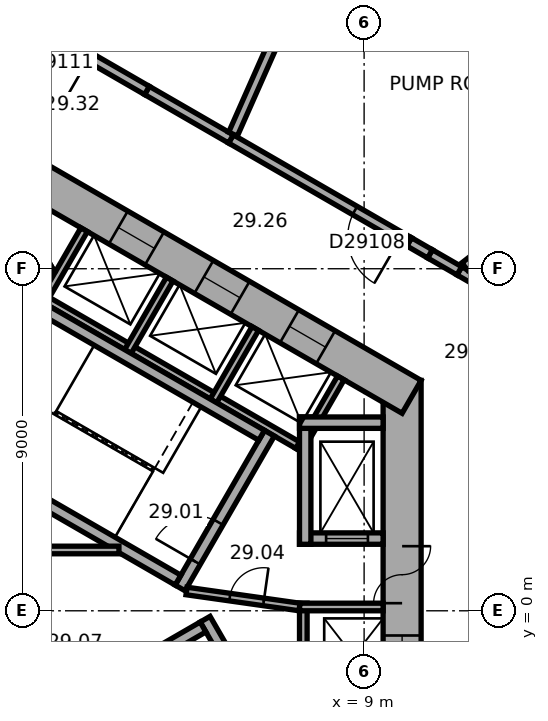
"""IFC4 building model, lengths in metres.
Left out: names, types, materials, properties, quantities, classifications, styles, units other than length and angle.
Written with IfcOpenShell. Run it as: python <this file> out.ifc"""

import sys

from ifc_helpers import new_model, si_unit, direction, frame, frame_2d, origin, place, context, subcontext, project, spatial, rectangle, extrude, element, fill, save


model = new_model("IFC4")
c1 = context("Model", 3, precision=1e-05, world=origin(), true_north=direction((0.0, 1.0)))
c2 = subcontext(c1, "Body", "Model", "MODEL_VIEW")
j1 = project(units=[si_unit("LENGTHUNIT", "METRE"), si_unit("PLANEANGLEUNIT", "RADIAN")], contexts=[c1])
p1 = place(None, origin())
s1 = spatial("IfcSite", under=j1, at=p1, CompositionType="ELEMENT")
p2 = place(p1, origin())
s2 = spatial("IfcBuilding", under=s1, at=p2, CompositionType="ELEMENT")
p3 = place(p2, frame((0.0, 0.0, 119.9)))
s3 = spatial("IfcBuildingStorey", under=s2, at=p3, CompositionType="ELEMENT", Elevation=119.9)
p4 = place(p3, frame((10.0, -6.062, 0.0), z_axis=(0.0, 0.0, 1.0), x_axis=(0.0, 1.0, 0.0)))
e1 = element("IfcWall", 1, at=p4, inside=s3, PredefinedType="SHEAR", context=c2, shape_type="SweptSolid", body=[
    extrude(rectangle(XDim=12.125, YDim=1.0, at=frame_2d((6.062, 0.0))), origin(), (0.0, 0.0, 1.0), 4.5),
])
p5 = place(p4, frame((6.262, 0.0, 0.0)))
e2 = element("IfcOpeningElement", 2, at=p5, cuts=e1, PredefinedType="OPENING", context=c2, shape_type="SweptSolid", body=[
    extrude(rectangle(XDim=1.5, YDim=2.1, at=frame_2d((0.75, 1.05))), frame((0.0, 0.51, 0.0), z_axis=(0.0, -1.0, 0.0), x_axis=(1.0, 0.0, 0.0)), (0.0, 0.0, 1.0), 1.02),
])
p6 = place(p4, frame((1.712, 0.0, 0.0)))
e3 = element("IfcOpeningElement", 3, at=p6, cuts=e1, PredefinedType="OPENING", context=c2, shape_type="SweptSolid", body=[
    extrude(rectangle(XDim=1.1, YDim=2.1, at=frame_2d((0.55, 1.05))), frame((0.0, 0.51, 0.0), z_axis=(0.0, -1.0, 0.0), x_axis=(1.0, 0.0, 0.0)), (0.0, 0.0, 1.0), 1.02),
])
p7 = place(p4, frame((4.312, 0.0, 0.0)))
e4 = element("IfcOpeningElement", 4, at=p7, cuts=e1, PredefinedType="OPENING", context=c2, shape_type="SweptSolid", body=[
    extrude(rectangle(XDim=1.1, YDim=2.1, at=frame_2d((0.55, 1.05))), frame((0.0, 0.51, 0.0), z_axis=(0.0, -1.0, 0.0), x_axis=(1.0, 0.0, 0.0)), (0.0, 0.0, 1.0), 1.02),
])
p8 = place(p3, frame((10.25, 5.629, 0.0), z_axis=(0.0, 0.0, 1.0), x_axis=(-0.866022616891, 0.50000482701, 0.0)))
e5 = element("IfcWall", 5, at=p8, inside=s3, PredefinedType="SHEAR", context=c2, shape_type="SweptSolid", body=[
    extrude(rectangle(XDim=12.125, YDim=1.0, at=frame_2d((6.062, 0.0))), origin(), (0.0, 0.0, 1.0), 4.5),
])
p9 = place(p8, frame((2.612, 0.0, 0.0)))
e6 = element("IfcOpeningElement", 6, at=p9, cuts=e5, PredefinedType="OPENING", context=c2, shape_type="SweptSolid", body=[
    extrude(rectangle(XDim=1.1, YDim=2.1, at=frame_2d((0.55, 1.05))), frame((0.0, 0.51, 0.0), z_axis=(0.0, -1.0, 0.0), x_axis=(1.0, 0.0, 0.0)), (0.0, 0.0, 1.0), 1.02),
])
p10 = place(p8, frame((5.212, 0.0, 0.0)))
e7 = element("IfcOpeningElement", 7, at=p10, cuts=e5, PredefinedType="OPENING", context=c2, shape_type="SweptSolid", body=[
    extrude(rectangle(XDim=1.1, YDim=2.1, at=frame_2d((0.55, 1.05))), frame((0.0, 0.51, 0.0), z_axis=(0.0, -1.0, 0.0), x_axis=(1.0, 0.0, 0.0)), (0.0, 0.0, 1.0), 1.02),
])
p11 = place(p8, frame((7.812, 0.0, 0.0)))
e8 = element("IfcOpeningElement", 8, at=p11, cuts=e5, PredefinedType="OPENING", context=c2, shape_type="SweptSolid", body=[
    extrude(rectangle(XDim=1.1, YDim=2.1, at=frame_2d((0.55, 1.05))), frame((0.0, 0.51, 0.0), z_axis=(0.0, -1.0, 0.0), x_axis=(1.0, 0.0, 0.0)), (0.0, 0.0, 1.0), 1.02),
])
p12 = place(p3, frame((7.4, -5.2, 0.0), z_axis=(0.0, 0.0, 1.0), x_axis=(0.0, 1.0, 0.0)))
e9 = element("IfcWall", 9, at=p12, inside=s3, PredefinedType="PARTITIONING", context=c2, shape_type="SweptSolid", body=[
    extrude(rectangle(XDim=5.4, YDim=0.2, at=frame_2d((2.7, 0.0))), origin(), (0.0, 0.0, 1.0), 4.22),
])
p13 = place(p3, frame((7.3, 0.1, 0.0), z_axis=(0.0, 0.0, 1.0), x_axis=(1.0, 0.0, 0.0)))
e10 = element("IfcWall", 10, at=p13, inside=s3, PredefinedType="PARTITIONING", context=c2, shape_type="SweptSolid", body=[
    extrude(rectangle(XDim=2.2, YDim=0.2, at=frame_2d((1.1, 0.0))), origin(), (0.0, 0.0, 1.0), 4.22),
])
p14 = place(p3, frame((7.424, 4.259, 0.0), z_axis=(0.0, 0.0, 1.0), x_axis=(-0.866026010844, 0.49999894854, 0.0)))
e11 = element("IfcWall", 11, at=p14, inside=s3, PredefinedType="PARTITIONING", context=c2, shape_type="SweptSolid", body=[
    extrude(rectangle(XDim=8.0, YDim=0.2, at=frame_2d((4.0, 0.0))), origin(), (0.0, 0.0, 1.0), 4.22),
])
for number, where, z_axis, x_axis in (
    (12, (7.287, 4.222, 0.0), (0.0, 0.0, 1.0), (0.5, 0.866, 0.0)),
    (13, (5.036, 5.522, 0.0), (0.0, 0.0, 1.0), (0.5, 0.866, 0.0)),
    (14, (2.784, 6.822, 0.0), (0.0, 0.0, 1.0), (0.5, 0.866, 0.0)),
    (15, (0.532, 8.122, 0.0), (0.0, 0.0, 1.0), (0.5, 0.866, 0.0)),
):
    element("IfcWall", number, at=place(p3, frame(where, z_axis=z_axis, x_axis=x_axis)), inside=s3, PredefinedType="PARTITIONING", context=c2, shape_type="SweptSolid", body=[
        extrude(rectangle(XDim=2.2, YDim=0.2, at=frame_2d((1.1, 0.0))), origin(), (0.0, 0.0, 1.0), 4.22),
    ])
p15 = place(p3, frame((0.803, 9.009, 0.0), z_axis=(0.0, 0.0, 1.0), x_axis=(-0.866028230842, -0.499995103361, 0.0)))
e16 = element("IfcWall", 16, at=p15, inside=s3, PredefinedType="PARTITIONING", context=c2, shape_type="SweptSolid", body=[
    extrude(rectangle(XDim=5.4, YDim=0.2, at=frame_2d((2.7, 0.0))), origin(), (0.0, 0.0, 1.0), 4.22),
])
p16 = place(p3, frame((0.767, 8.872, 0.0), z_axis=(0.0, 0.0, 1.0), x_axis=(-0.499994660107, 0.866028486751, 0.0)))
e17 = element("IfcWall", 17, at=p16, inside=s3, PredefinedType="PARTITIONING", context=c2, shape_type="SweptSolid", body=[
    extrude(rectangle(XDim=2.2, YDim=0.2, at=frame_2d((1.1, 0.0))), origin(), (0.0, 0.0, 1.0), 4.22),
])
p17 = place(p3, frame((4.158, 0.602, 0.0), z_axis=(0.0, 0.0, 1.0), x_axis=(0.499977259774, 0.866038532462, 0.0)))
e18 = element("IfcWall", 18, at=p17, inside=s3, PredefinedType="SHEAR", context=c2, shape_type="SweptSolid", body=[
    extrude(rectangle(XDim=4.7, YDim=0.3, at=frame_2d((2.35, 0.0))), origin(), (0.0, 0.0, 1.0), 4.22),
])
p18 = place(p17, frame((0.8, 0.0, 0.0)))
e19 = element("IfcOpeningElement", 19, at=p18, cuts=e18, PredefinedType="OPENING", context=c2, shape_type="SweptSolid", body=[
    extrude(rectangle(XDim=1.2, YDim=2.1, at=frame_2d((0.6, 1.05))), frame((0.0, 0.16, 0.0), z_axis=(0.0, -1.0, 0.0), x_axis=(1.0, 0.0, 0.0)), (0.0, 0.0, 1.0), 0.32),
])
for number, where, z_axis, x_axis in (
    (20, (4.103, 0.807, 0.0), (0.0, 0.0, 1.0), (-0.866, 0.5, 0.0)),
    (21, (6.303, 4.617, 0.0), (0.0, 0.0, 1.0), (-0.866, 0.5, 0.0)),
):
    element("IfcWall", number, at=place(p3, frame(where, z_axis=z_axis, x_axis=x_axis)), inside=s3, PredefinedType="SHEAR", context=c2, shape_type="SweptSolid", body=[
        extrude(rectangle(XDim=7.06, YDim=0.3, at=frame_2d((3.53, 0.0))), origin(), (0.0, 0.0, 1.0), 4.22),
    ])
p19 = place(p3, frame((4.816, -0.222, 0.0), z_axis=(0.0, 0.0, 1.0), x_axis=(0.499977259774, -0.866038532462, 0.0)))
e22 = element("IfcWall", 22, at=p19, inside=s3, PredefinedType="SHEAR", context=c2, shape_type="SweptSolid", body=[
    extrude(rectangle(XDim=4.7, YDim=0.3, at=frame_2d((2.35, 0.0))), origin(), (0.0, 0.0, 1.0), 4.22),
])
p20 = place(p3, frame((-1.353, -3.957, 0.0), z_axis=(0.0, 0.0, 1.0), x_axis=(0.866027801685, 0.499995846692, 0.0)))
e23 = element("IfcWall", 23, at=p20, inside=s3, PredefinedType="SHEAR", context=c2, shape_type="SweptSolid", body=[
    extrude(rectangle(XDim=7.06, YDim=0.3, at=frame_2d((3.53, 0.0))), origin(), (0.0, 0.0, 1.0), 4.22),
])
p21 = place(p3, frame((7.3, 1.9, 0.0), z_axis=(0.0, 0.0, 1.0), x_axis=(1.0, 0.0, 0.0)))
e24 = element("IfcWall", 24, at=p21, inside=s3, PredefinedType="SHEAR", context=c2, shape_type="SweptSolid", body=[
    extrude(rectangle(XDim=2.2, YDim=0.3, at=frame_2d((1.1, 0.0))), origin(), (0.0, 0.0, 1.0), 4.22),
])
p22 = place(p21, frame((0.7, 0.0, 0.0)))
e25 = element("IfcOpeningElement", 25, at=p22, cuts=e24, PredefinedType="OPENING", context=c2, shape_type="SweptSolid", body=[
    extrude(rectangle(XDim=1.1, YDim=2.1, at=frame_2d((0.55, 1.05))), frame((0.0, 0.16, 0.0), z_axis=(0.0, -1.0, 0.0), x_axis=(1.0, 0.0, 0.0)), (0.0, 0.0, 1.0), 0.32),
])
p23 = place(p3, frame((7.45, 1.75, 0.0), z_axis=(0.0, 0.0, 1.0), x_axis=(0.0, 1.0, 0.0)))
e26 = element("IfcWall", 26, at=p23, inside=s3, PredefinedType="SHEAR", context=c2, shape_type="SweptSolid", body=[
    extrude(rectangle(XDim=3.35, YDim=0.3, at=frame_2d((1.675, 0.0))), origin(), (0.0, 0.0, 1.0), 4.22),
])
p24 = place(p3, frame((7.3, 4.95, 0.0), z_axis=(0.0, 0.0, 1.0), x_axis=(1.0, 0.0, 0.0)))
e27 = element("IfcWall", 27, at=p24, inside=s3, PredefinedType="SHEAR", context=c2, shape_type="SweptSolid", body=[
    extrude(rectangle(XDim=2.2, YDim=0.3, at=frame_2d((1.1, 0.0))), origin(), (0.0, 0.0, 1.0), 4.22),
])
p25 = place(p3, frame((4.327, 0.521, 0.0), z_axis=(0.0, 0.0, 1.0), x_axis=(0.990124376366, -0.14019172346, 0.0)))
e28 = element("IfcWall", 28, at=p25, inside=s3, PredefinedType="PARTITIONING", context=c2, shape_type="SweptSolid", body=[
    extrude(rectangle(XDim=3.002, YDim=0.2, at=frame_2d((1.501, 0.0))), origin(), (0.0, 0.0, 1.0), 4.22),
])
p26 = place(p25, frame((1.15, 0.0, 0.0)))
e29 = element("IfcOpeningElement", 29, at=p26, cuts=e28, PredefinedType="OPENING", context=c2, shape_type="SweptSolid", body=[
    extrude(rectangle(XDim=0.9, YDim=2.1, at=frame_2d((0.45, 1.05))), frame((0.0, 0.11, 0.0), z_axis=(0.0, -1.0, 0.0), x_axis=(1.0, 0.0, 0.0)), (0.0, 0.0, 1.0), 0.22),
])
p27 = place(p3, frame((-2.72, 1.6, 0.0), z_axis=(0.0, 0.0, 1.0), x_axis=(1.0, 0.0, 0.0)))
e30 = element("IfcWall", 30, at=p27, inside=s3, PredefinedType="PARTITIONING", context=c2, shape_type="SweptSolid", body=[
    extrude(rectangle(XDim=5.269, YDim=0.2, at=frame_2d((2.634, 0.0))), origin(), (0.0, 0.0, 1.0), 4.22),
])
p28 = place(p3, frame((13.5, 7.794, 0.0), z_axis=(0.0, 0.0, 1.0), x_axis=(-0.86594365243, 0.500141570774, 0.0)))
e31 = element("IfcWall", 31, at=p28, inside=s3, PredefinedType="SOLIDWALL", context=c2, shape_type="SweptSolid", body=[
    extrude(rectangle(XDim=2.302, YDim=0.25, at=frame_2d((1.151, 0.0))), origin(), (0.0, 0.0, 1.0), 4.22),
])
p29 = place(p3, frame((10.733, 9.392, 0.0), z_axis=(0.0, 0.0, 1.0), x_axis=(0.86606255962, -0.499935638681, 0.0)))
e32 = element("IfcWall", 32, at=p29, inside=s3, PredefinedType="SOLIDWALL", context=c2, shape_type="SweptSolid", body=[
    extrude(rectangle(XDim=0.892, YDim=0.25, at=frame_2d((0.446, 0.0))), origin(), (0.0, 0.0, 1.0), 4.22),
])
p30 = place(p3, frame((10.186, 9.708, 0.0), z_axis=(0.0, 0.0, 1.0), x_axis=(0.866024844342, -0.500000968981, 0.0)))
e33 = element("IfcWall", 33, at=p30, inside=s3, PredefinedType="SOLIDWALL", context=c2, shape_type="SweptSolid", body=[
    extrude(rectangle(XDim=0.632, YDim=0.25, at=frame_2d((0.316, 0.0))), origin(), (0.0, 0.0, 1.0), 4.22),
])
p31 = place(p3, frame((10.186, 9.708, 0.0), z_axis=(0.0, 0.0, 1.0), x_axis=(-0.866018196172, 0.500012483742, 0.0)))
e34 = element("IfcWall", 34, at=p31, inside=s3, PredefinedType="SOLIDWALL", context=c2, shape_type="SweptSolid", body=[
    extrude(rectangle(XDim=5.416, YDim=0.25, at=frame_2d((2.708, 0.0))), origin(), (0.0, 0.0, 1.0), 4.22),
])
p32 = place(p31, frame((0.25, 0.0, 0.0)))
e35 = element("IfcOpeningElement", 35, at=p32, cuts=e34, PredefinedType="OPENING", context=c2, shape_type="SweptSolid", body=[
    extrude(rectangle(XDim=1.4, YDim=2.1, at=frame_2d((0.7, 1.05))), frame((0.0, 0.135, 0.0), z_axis=(0.0, -1.0, 0.0), x_axis=(1.0, 0.0, 0.0)), (0.0, 0.0, 1.0), 0.27),
])
p33 = place(p3, frame((15.427, 11.993, 0.0), z_axis=(0.0, 0.0, 1.0), x_axis=(-0.789492280001, -0.613760490597, 0.0)))
e36 = element("IfcWall", 36, at=p33, inside=s3, PredefinedType="SOLIDWALL", context=c2, shape_type="SweptSolid", body=[
    extrude(rectangle(XDim=4.786, YDim=0.25, at=frame_2d((2.393, 0.0))), origin(), (0.0, 0.0, 1.0), 3.2),
])
p34 = place(p3, frame((5.495, 12.416, 0.0), z_axis=(0.0, 0.0, 1.0), x_axis=(-0.866043744811, 0.499968231064, 0.0)))
e37 = element("IfcWall", 37, at=p34, inside=s3, PredefinedType="SOLIDWALL", context=c2, shape_type="SweptSolid", body=[
    extrude(rectangle(XDim=2.551, YDim=0.25, at=frame_2d((1.275, 0.0))), origin(), (0.0, 0.0, 1.0), 4.22),
])
p35 = place(p3, frame((3.286, 13.691, 0.0), z_axis=(0.0, 0.0, 1.0), x_axis=(-0.866013897511, 0.50001992892, 0.0)))
e38 = element("IfcWall", 38, at=p35, inside=s3, PredefinedType="SOLIDWALL", context=c2, shape_type="SweptSolid", body=[
    extrude(rectangle(XDim=3.694, YDim=0.25, at=frame_2d((1.847, 0.0))), origin(), (0.0, 0.0, 1.0), 4.22),
])
p36 = place(p35, frame((1.744, 0.0, 0.0)))
e39 = element("IfcOpeningElement", 39, at=p36, cuts=e38, PredefinedType="OPENING", context=c2, shape_type="SweptSolid", body=[
    extrude(rectangle(XDim=1.4, YDim=2.1, at=frame_2d((0.7, 1.05))), frame((0.0, 0.135, 0.0), z_axis=(0.0, -1.0, 0.0), x_axis=(1.0, 0.0, 0.0)), (0.0, 0.0, 1.0), 0.27),
])
p37 = place(p3, frame((7.367, 16.646, 0.0), z_axis=(0.0, 0.0, 1.0), x_axis=(-0.404689706038, -0.914454067642, 0.0)))
e40 = element("IfcWall", 40, at=p37, inside=s3, PredefinedType="SOLIDWALL", context=c2, shape_type="SweptSolid", body=[
    extrude(rectangle(XDim=4.489, YDim=0.25, at=frame_2d((2.245, 0.0))), origin(), (0.0, 0.0, 1.0), 3.2),
])
p38 = place(p3, frame((8.671, 19.589, 0.0), z_axis=(0.0, 0.0, 1.0), x_axis=(0.894943312415, -0.446179860106, 0.0)))
e41 = element("IfcWall", 41, at=p38, inside=s3, PredefinedType="SOLIDWALL", context=c2, shape_type="SweptSolid", body=[
    extrude(rectangle(XDim=11.245, YDim=0.25, at=frame_2d((5.623, 0.0))), origin(), (0.0, 0.0, 1.0), 3.72),
])
p39 = place(p5, origin())
e42 = element("IfcDoor", 42, at=p39, inside=s3, OperationType="DOUBLE_DOOR_SINGLE_SWING", PredefinedType="DOOR", context=c2, shape_type="SweptSolid", body=[
    extrude(rectangle(XDim=1.5, YDim=2.1, at=frame_2d((0.75, 1.05))), frame((0.0, 0.025, 0.0), z_axis=(0.0, -1.0, 0.0), x_axis=(1.0, 0.0, 0.0)), (0.0, 0.0, 1.0), 0.05),
])
fill(e2, e42)
p40 = place(p18, origin())
e43 = element("IfcDoor", 43, at=p40, inside=s3, OperationType="SINGLE_SWING_RIGHT", PredefinedType="DOOR", context=c2, shape_type="SweptSolid", body=[
    extrude(rectangle(XDim=1.2, YDim=2.1, at=frame_2d((0.6, 1.05))), frame((0.0, 0.025, 0.0), z_axis=(0.0, -1.0, 0.0), x_axis=(1.0, 0.0, 0.0)), (0.0, 0.0, 1.0), 0.05),
])
fill(e19, e43)
p41 = place(p26, origin())
e44 = element("IfcDoor", 44, at=p41, inside=s3, OperationType="SINGLE_SWING_LEFT", PredefinedType="DOOR", context=c2, shape_type="SweptSolid", body=[
    extrude(rectangle(XDim=0.9, YDim=2.1, at=frame_2d((0.45, 1.05))), frame((0.0, 0.025, 0.0), z_axis=(0.0, -1.0, 0.0), x_axis=(1.0, 0.0, 0.0)), (0.0, 0.0, 1.0), 0.05),
])
fill(e29, e44)
p42 = place(p22, origin())
e45 = element("IfcDoor", 45, at=p42, inside=s3, OperationType="DOUBLE_DOOR_SLIDING", PredefinedType="DOOR", context=c2, shape_type="SweptSolid", body=[
    extrude(rectangle(XDim=1.1, YDim=2.1, at=frame_2d((0.55, 1.05))), frame((0.0, 0.025, 0.0), z_axis=(0.0, -1.0, 0.0), x_axis=(1.0, 0.0, 0.0)), (0.0, 0.0, 1.0), 0.05),
])
fill(e25, e45)
p43 = place(p7, origin())
e46 = element("IfcDoor", 46, at=p43, inside=s3, OperationType="DOUBLE_DOOR_SLIDING", PredefinedType="DOOR", context=c2, shape_type="SweptSolid", body=[
    extrude(rectangle(XDim=1.1, YDim=2.1, at=frame_2d((0.55, 1.05))), frame((0.0, 0.025, 0.0), z_axis=(0.0, -1.0, 0.0), x_axis=(1.0, 0.0, 0.0)), (0.0, 0.0, 1.0), 0.05),
])
fill(e4, e46)
p44 = place(p9, origin())
e47 = element("IfcDoor", 47, at=p44, inside=s3, OperationType="DOUBLE_DOOR_SLIDING", PredefinedType="DOOR", context=c2, shape_type="SweptSolid", body=[
    extrude(rectangle(XDim=1.1, YDim=2.1, at=frame_2d((0.55, 1.05))), frame((0.0, 0.025, 0.0), z_axis=(0.0, -1.0, 0.0), x_axis=(1.0, 0.0, 0.0)), (0.0, 0.0, 1.0), 0.05),
])
fill(e6, e47)
p45 = place(p10, origin())
e48 = element("IfcDoor", 48, at=p45, inside=s3, OperationType="DOUBLE_DOOR_SLIDING", PredefinedType="DOOR", context=c2, shape_type="SweptSolid", body=[
    extrude(rectangle(XDim=1.1, YDim=2.1, at=frame_2d((0.55, 1.05))), frame((0.0, 0.025, 0.0), z_axis=(0.0, -1.0, 0.0), x_axis=(1.0, 0.0, 0.0)), (0.0, 0.0, 1.0), 0.05),
])
fill(e7, e48)
p46 = place(p11, origin())
e49 = element("IfcDoor", 49, at=p46, inside=s3, OperationType="DOUBLE_DOOR_SLIDING", PredefinedType="DOOR", context=c2, shape_type="SweptSolid", body=[
    extrude(rectangle(XDim=1.1, YDim=2.1, at=frame_2d((0.55, 1.05))), frame((0.0, 0.025, 0.0), z_axis=(0.0, -1.0, 0.0), x_axis=(1.0, 0.0, 0.0)), (0.0, 0.0, 1.0), 0.05),
])
fill(e8, e49)
p47 = place(p32, origin())
e50 = element("IfcDoor", 50, at=p47, inside=s3, OperationType="SINGLE_SWING_LEFT", PredefinedType="DOOR", context=c2, shape_type="SweptSolid", body=[
    extrude(rectangle(XDim=1.4, YDim=2.1, at=frame_2d((0.7, 1.05))), frame((0.0, 0.025, 0.0), z_axis=(0.0, -1.0, 0.0), x_axis=(1.0, 0.0, 0.0)), (0.0, 0.0, 1.0), 0.05),
])
fill(e35, e50)
p48 = place(p36, origin())
e51 = element("IfcDoor", 51, at=p48, inside=s3, OperationType="SINGLE_SWING_LEFT", PredefinedType="DOOR", context=c2, shape_type="SweptSolid", body=[
    extrude(rectangle(XDim=1.4, YDim=2.1, at=frame_2d((0.7, 1.05))), frame((0.0, 0.025, 0.0), z_axis=(0.0, -1.0, 0.0), x_axis=(1.0, 0.0, 0.0)), (0.0, 0.0, 1.0), 0.05),
])
fill(e39, e51)
save(model, sys.argv[1])
